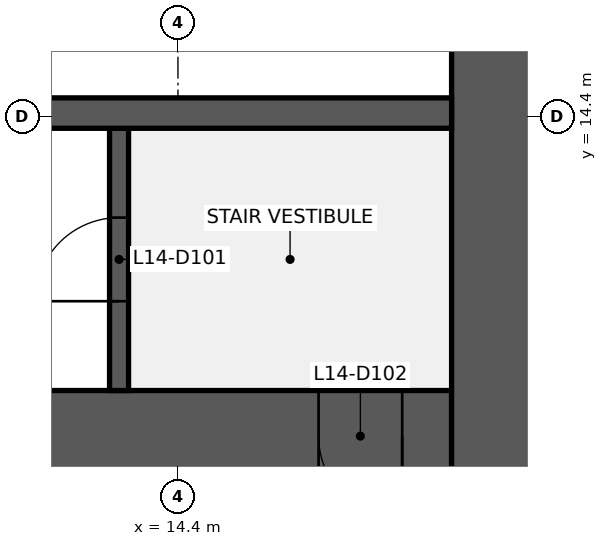
"""IFC4 building model, lengths in metres.
Left out: names, types, materials, properties, quantities, classifications, styles, units other than length and angle.
Written with IfcOpenShell. Run it as: python <this file> out.ifc"""

import sys

from ifc_helpers import new_model, si_unit, direction, frame, frame_2d, origin, place, context, subcontext, project, spatial, rectangle, extrude, element, fill, save


model = new_model("IFC4")
c1 = context("Model", 3, precision=1e-05, world=origin(), true_north=direction((0.0, 1.0)))
c2 = subcontext(c1, "Body", "Model", "MODEL_VIEW")
j1 = project(units=[si_unit("LENGTHUNIT", "METRE"), si_unit("PLANEANGLEUNIT", "RADIAN")], contexts=[c1])
p1 = place(None, origin())
s1 = spatial("IfcSite", under=j1, at=p1, CompositionType="ELEMENT")
p2 = place(p1, origin())
s2 = spatial("IfcBuilding", under=s1, at=p2, CompositionType="ELEMENT")
p3 = place(p2, frame((0.0, 0.0, 67.0)))
s3 = spatial("IfcBuildingStorey", under=s2, at=p3, CompositionType="ELEMENT", Elevation=67.0)
p4 = place(p3, frame((18.0, 10.2, 0.0), z_axis=(0.0, 0.0, 1.0), x_axis=(-1.0, 0.0, 0.0)))
e1 = element("IfcWall", 1, at=p4, inside=s3, PredefinedType="SHEAR", context=c2, shape_type="SweptSolid", body=[
    extrude(rectangle(XDim=13.2, YDim=1.2, at=frame_2d((6.6, 0.0))), origin(), (0.0, 0.0, 1.0), 3.84),
])
p5 = place(p4, frame((0.65, 0.0, 0.0)))
e2 = element("IfcOpeningElement", 2, at=p5, cuts=e1, PredefinedType="OPENING", context=c2, shape_type="SweptSolid", body=[
    extrude(rectangle(XDim=1.1, YDim=2.1, at=frame_2d((0.55, 1.05))), frame((0.0, 0.61, 0.0), z_axis=(0.0, -1.0, 0.0), x_axis=(1.0, 0.0, 0.0)), (0.0, 0.0, 1.0), 1.22),
])
p6 = place(p3, frame((18.6, 38.4, 0.0), z_axis=(0.0, 0.0, 1.0), x_axis=(0.0, -1.0, 0.0)))
e3 = element("IfcWall", 3, at=p6, inside=s3, PredefinedType="SHEAR", context=c2, shape_type="SweptSolid", body=[
    extrude(rectangle(XDim=28.8, YDim=1.2, at=frame_2d((14.4, 0.0))), origin(), (0.0, 0.0, 1.0), 3.84),
])
p7 = place(p6, frame((18.3, 0.0, 0.0)))
e4 = element("IfcOpeningElement", 4, at=p7, cuts=e3, PredefinedType="OPENING", context=c2, shape_type="SweptSolid", body=[
    extrude(rectangle(XDim=1.8, YDim=2.1, at=frame_2d((0.9, 1.05))), frame((0.0, 0.61, 0.0), z_axis=(0.0, -1.0, 0.0), x_axis=(1.0, 0.0, 0.0)), (0.0, 0.0, 1.0), 1.22),
])
p8 = place(p6, frame((8.7, 0.0, 0.0)))
e5 = element("IfcOpeningElement", 5, at=p8, cuts=e3, PredefinedType="OPENING", context=c2, shape_type="SweptSolid", body=[
    extrude(rectangle(XDim=1.8, YDim=2.1, at=frame_2d((0.9, 1.05))), frame((0.0, 0.61, 0.0), z_axis=(0.0, -1.0, 0.0), x_axis=(1.0, 0.0, 0.0)), (0.0, 0.0, 1.0), 1.22),
])
p9 = place(p3, frame((13.625, 10.8, 0.0), z_axis=(0.0, 0.0, 1.0), x_axis=(0.0, 1.0, 0.0)))
e6 = element("IfcWall", 6, at=p9, inside=s3, PredefinedType="SHEAR", context=c2, shape_type="SweptSolid", body=[
    extrude(rectangle(XDim=3.45, YDim=0.25, at=frame_2d((1.725, 0.0))), origin(), (0.0, 0.0, 1.0), 3.84),
])
p10 = place(p9, frame((1.175, 0.0, 0.0)))
e7 = element("IfcOpeningElement", 7, at=p10, cuts=e6, PredefinedType="OPENING", context=c2, shape_type="SweptSolid", body=[
    extrude(rectangle(XDim=1.1, YDim=2.1, at=frame_2d((0.55, 1.05))), frame((0.0, 0.135, 0.0), z_axis=(0.0, -1.0, 0.0), x_axis=(1.0, 0.0, 0.0)), (0.0, 0.0, 1.0), 0.27),
])
p11 = place(p3, frame((1.2, 14.45, 0.0), z_axis=(0.0, 0.0, 1.0), x_axis=(1.0, 0.0, 0.0)))
e8 = element("IfcWall", 8, at=p11, inside=s3, PredefinedType="SHEAR", context=c2, shape_type="SweptSolid", body=[
    extrude(rectangle(XDim=16.8, YDim=0.4, at=frame_2d((8.4, 0.0))), origin(), (0.0, 0.0, 1.0), 3.84),
])
p12 = place(p10, origin())
e9 = element("IfcDoor", 9, at=p12, inside=s3, OperationType="SINGLE_SWING_LEFT", PredefinedType="DOOR", context=c2, shape_type="SweptSolid", body=[
    extrude(rectangle(XDim=1.1, YDim=2.1, at=frame_2d((0.55, 1.05))), frame((0.0, 0.025, 0.0), z_axis=(0.0, -1.0, 0.0), x_axis=(1.0, 0.0, 0.0)), (0.0, 0.0, 1.0), 0.05),
])
fill(e7, e9)
p13 = place(p5, origin())
e10 = element("IfcDoor", 10, at=p13, inside=s3, OperationType="SINGLE_SWING_LEFT", PredefinedType="DOOR", context=c2, shape_type="SweptSolid", body=[
    extrude(rectangle(XDim=1.1, YDim=2.1, at=frame_2d((0.55, 1.05))), frame((0.0, 0.025, 0.0), z_axis=(0.0, -1.0, 0.0), x_axis=(1.0, 0.0, 0.0)), (0.0, 0.0, 1.0), 0.05),
])
fill(e2, e10)
save(model, sys.argv[1])
